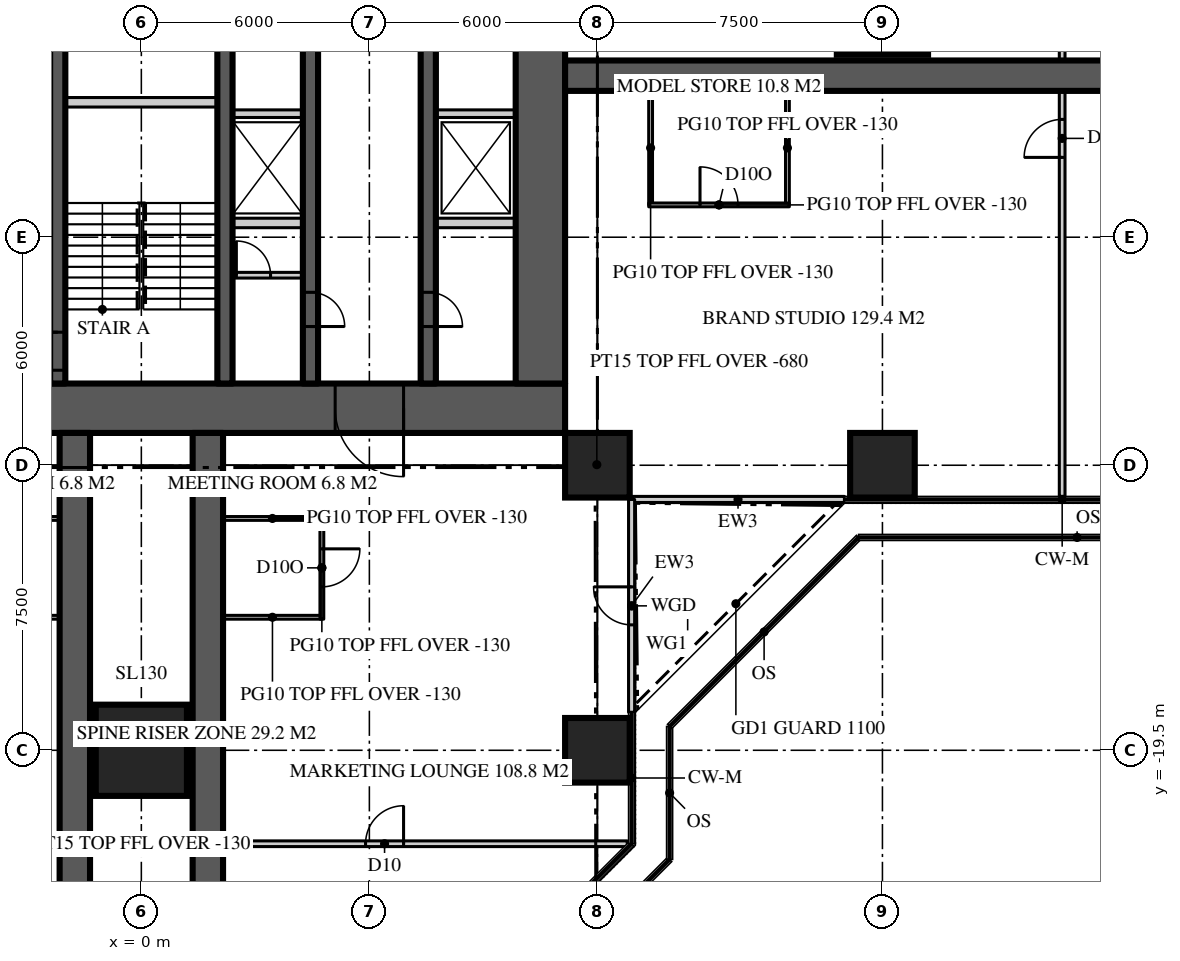
"""IFC4 building model, lengths in metres.
Left out: names, types, materials, properties, quantities, classifications, styles, units other than length and angle.
Written with IfcOpenShell. Run it as: python <this file> out.ifc"""

import sys

from ifc_helpers import new_model, si_unit, direction, frame, frame_2d, origin, origin_2d, place, context, subcontext, project, spatial, rectangle, extrude, element, fill, save


model = new_model("IFC4")
c1 = context("Model", 3, precision=1e-05, world=origin(), true_north=direction((0.0, 1.0)))
c2 = subcontext(c1, "Body", "Model", "MODEL_VIEW")
j1 = project(units=[si_unit("LENGTHUNIT", "METRE"), si_unit("PLANEANGLEUNIT", "RADIAN")], contexts=[c1])
p1 = place(None, origin())
s1 = spatial("IfcSite", under=j1, at=p1, CompositionType="ELEMENT")
p2 = place(p1, origin())
s2 = spatial("IfcBuilding", under=s1, at=p2, CompositionType="ELEMENT")
p3 = place(p2, frame((0.0, 0.0, 186.6)))
s3 = spatial("IfcBuildingStorey", under=s2, at=p3, CompositionType="ELEMENT", Elevation=186.6)
p4 = place(p3, frame((11.15, -10.5, 0.0), z_axis=(0.0, 0.0, 1.0), x_axis=(-1.0, 0.0, 0.0)))
e1 = element("IfcWall", 1, at=p4, inside=s3, PredefinedType="SHEAR", context=c2, shape_type="SweptSolid", body=[
    extrude(rectangle(XDim=22.3, YDim=1.3, at=frame_2d((11.15, 0.0))), origin(), (0.0, 0.0, 1.0), 3.9),
])
p5 = place(p4, frame((16.25, 0.0, 0.0)))
e2 = element("IfcOpeningElement", 2, at=p5, cuts=e1, PredefinedType="OPENING", context=c2, shape_type="SweptSolid", body=[
    extrude(rectangle(XDim=1.8, YDim=2.2, at=frame_2d((0.9, 1.1))), frame((0.0, 0.66, 0.0), z_axis=(0.0, -1.0, 0.0), x_axis=(1.0, 0.0, 0.0)), (0.0, 0.0, 1.0), 1.32),
])
p6 = place(p4, frame((4.25, 0.0, 0.0)))
e3 = element("IfcOpeningElement", 3, at=p6, cuts=e1, PredefinedType="OPENING", context=c2, shape_type="SweptSolid", body=[
    extrude(rectangle(XDim=1.8, YDim=2.2, at=frame_2d((0.9, 1.1))), frame((0.0, 0.66, 0.0), z_axis=(0.0, -1.0, 0.0), x_axis=(1.0, 0.0, 0.0)), (0.0, 0.0, 1.0), 1.32),
])
p7 = place(p3, frame((10.5, -9.85, 0.0), z_axis=(0.0, 0.0, 1.0), x_axis=(0.0, 1.0, 0.0)))
e4 = element("IfcWall", 4, at=p7, inside=s3, PredefinedType="SHEAR", context=c2, shape_type="SweptSolid", body=[
    extrude(rectangle(XDim=19.7, YDim=1.3, at=frame_2d((9.85, 0.0))), origin(), (0.0, 0.0, 1.0), 3.9),
])
p8 = place(p7, frame((17.25, 0.0, 0.0)))
e5 = element("IfcOpeningElement", 5, at=p8, cuts=e4, PredefinedType="OPENING", context=c2, shape_type="SweptSolid", body=[
    extrude(rectangle(XDim=1.0, YDim=2.2, at=frame_2d((0.5, 1.1))), frame((0.0, 0.66, 0.0), z_axis=(0.0, -1.0, 0.0), x_axis=(1.0, 0.0, 0.0)), (0.0, 0.0, 1.0), 1.32),
])
for number, where, z_axis, x_axis in (
    (6, (11.15, -1.75, 0.0), (0.0, 0.0, 1.0), (1.0, 0.0, 0.0)),
    (7, (-1.75, -11.15, 0.0), (0.0, 0.0, 1.0), (0.0, -1.0, 0.0)),
    (8, (1.75, -11.15, 0.0), (0.0, 0.0, 1.0), (0.0, -1.0, 0.0)),
):
    element("IfcWall", number, at=place(p3, frame(where, z_axis=z_axis, x_axis=x_axis)), inside=s3, PredefinedType="SHEAR", context=c2, shape_type="SweptSolid", body=[
        extrude(rectangle(XDim=15.25, YDim=0.8, at=frame_2d((7.625, 0.0))), origin(), (0.0, 0.0, 1.0), 3.9),
    ])
p9 = place(p3, frame((0.0, -19.5, 0.0), z_axis=(0.0, 0.0, 1.0), x_axis=(1.0, 0.0, 0.0)))
e9 = element("IfcColumn", 9, at=p9, inside=s3, PredefinedType="COLUMN", context=c2, shape_type="SweptSolid", body=[
    extrude(rectangle(XDim=2.4, YDim=2.4, at=origin_2d()), origin(), (0.0, 0.0, 1.0), 3.9),
])
for number, where, z_axis, x_axis in (
    (10, (12.0, -19.5, 0.0), (0.0, 0.0, 1.0), (1.0, 0.0, 0.0)),
    (11, (12.0, -12.0, 0.0), (0.0, 0.0, 1.0), (1.0, 0.0, 0.0)),
    (12, (19.5, -12.0, 0.0), (0.0, 0.0, 1.0), (1.0, 0.0, 0.0)),
):
    element("IfcColumn", number, at=place(p3, frame(where, z_axis=z_axis, x_axis=x_axis)), inside=s3, PredefinedType="COLUMN", context=c2, shape_type="SweptSolid", body=[
        extrude(rectangle(XDim=1.7, YDim=1.7, at=origin_2d()), origin(), (0.0, 0.0, 1.0), 3.9),
    ])
p10 = place(p3, frame((19.5, 0.0, 0.0), z_axis=(0.0, 0.0, 1.0), x_axis=(1.0, 0.0, 0.0)))
e13 = element("IfcColumn", 13, at=p10, inside=s3, PredefinedType="COLUMN", context=c2, shape_type="SweptSolid", body=[
    extrude(rectangle(XDim=2.4, YDim=2.4, at=origin_2d()), origin(), (0.0, 0.0, 1.0), 3.9),
])
p11 = place(p3, frame((12.9, -12.9, 0.0), z_axis=(0.0, 0.0, 1.0), x_axis=(1.0, 0.0, 0.0)))
e14 = element("IfcWall", 14, at=p11, inside=s3, PredefinedType="SOLIDWALL", context=c2, shape_type="SweptSolid", body=[
    extrude(rectangle(XDim=5.6, YDim=0.16, at=frame_2d((2.8, 0.0))), origin(), (0.0, 0.0, 1.0), 3.77),
])
p12 = place(p3, frame((12.9, -18.5, 0.0), z_axis=(0.0, 0.0, 1.0), x_axis=(0.0, 1.0, 0.0)))
e15 = element("IfcWall", 15, at=p12, inside=s3, PredefinedType="SOLIDWALL", context=c2, shape_type="SweptSolid", body=[
    extrude(rectangle(XDim=5.6, YDim=0.16, at=frame_2d((2.8, 0.0))), origin(), (0.0, 0.0, 1.0), 3.77),
])
p13 = place(p12, frame((2.3, 0.0, 0.0)))
e16 = element("IfcOpeningElement", 16, at=p13, cuts=e15, PredefinedType="OPENING", context=c2, shape_type="SweptSolid", body=[
    extrude(rectangle(XDim=1.0, YDim=2.2, at=frame_2d((0.5, 1.1))), frame((0.0, 0.09, 0.0), z_axis=(0.0, -1.0, 0.0), x_axis=(1.0, 0.0, 0.0)), (0.0, 0.0, 1.0), 0.18),
])
p14 = place(p3, frame((7.55, 9.85, 0.0), z_axis=(0.0, 0.0, 1.0), x_axis=(0.0, -1.0, 0.0)))
e17 = element("IfcWall", 17, at=p14, inside=s3, PredefinedType="SHEAR", context=c2, shape_type="SweptSolid", body=[
    extrude(rectangle(XDim=19.7, YDim=0.4, at=frame_2d((9.85, 0.0))), origin(), (0.0, 0.0, 1.0), 3.9),
])
p15 = place(p14, frame((1.45, 0.0, 0.0)))
e18 = element("IfcOpeningElement", 18, at=p15, cuts=e17, PredefinedType="OPENING", context=c2, shape_type="SweptSolid", body=[
    extrude(rectangle(XDim=1.0, YDim=2.2, at=frame_2d((0.5, 1.1))), frame((0.0, 0.21, 0.0), z_axis=(0.0, -1.0, 0.0), x_axis=(1.0, 0.0, 0.0)), (0.0, 0.0, 1.0), 0.42),
])
p16 = place(p14, frame((17.3, 0.0, 0.0)))
e19 = element("IfcOpeningElement", 19, at=p16, cuts=e17, PredefinedType="OPENING", context=c2, shape_type="SweptSolid", body=[
    extrude(rectangle(XDim=0.9, YDim=2.1, at=frame_2d((0.45, 1.05))), frame((0.0, 0.21, 0.0), z_axis=(0.0, -1.0, 0.0), x_axis=(1.0, 0.0, 0.0)), (0.0, 0.0, 1.0), 0.42),
])
p17 = place(p3, frame((4.45, 9.85, 0.0), z_axis=(0.0, 0.0, 1.0), x_axis=(0.0, -1.0, 0.0)))
e20 = element("IfcWall", 20, at=p17, inside=s3, PredefinedType="SHEAR", context=c2, shape_type="SweptSolid", body=[
    extrude(rectangle(XDim=19.7, YDim=0.4, at=frame_2d((9.85, 0.0))), origin(), (0.0, 0.0, 1.0), 3.9),
])
p18 = place(p17, frame((1.95, 0.0, 0.0)))
e21 = element("IfcOpeningElement", 21, at=p18, cuts=e20, PredefinedType="OPENING", context=c2, shape_type="SweptSolid", body=[
    extrude(rectangle(XDim=1.0, YDim=2.2, at=frame_2d((0.5, 1.1))), frame((0.0, 0.21, 0.0), z_axis=(0.0, -1.0, 0.0), x_axis=(1.0, 0.0, 0.0)), (0.0, 0.0, 1.0), 0.42),
])
p19 = place(p17, frame((17.3, 0.0, 0.0)))
e22 = element("IfcOpeningElement", 22, at=p19, cuts=e20, PredefinedType="OPENING", context=c2, shape_type="SweptSolid", body=[
    extrude(rectangle(XDim=0.9, YDim=2.1, at=frame_2d((0.45, 1.05))), frame((0.0, 0.21, 0.0), z_axis=(0.0, -1.0, 0.0), x_axis=(1.0, 0.0, 0.0)), (0.0, 0.0, 1.0), 0.42),
])
p20 = place(p3, frame((-2.2, -9.85, 0.0), z_axis=(0.0, 0.0, 1.0), x_axis=(0.0, 1.0, 0.0)))
e23 = element("IfcWall", 23, at=p20, inside=s3, PredefinedType="SHEAR", context=c2, shape_type="SweptSolid", body=[
    extrude(rectangle(XDim=19.7, YDim=0.4, at=frame_2d((9.85, 0.0))), origin(), (0.0, 0.0, 1.0), 3.9),
])
p21 = place(p20, frame((0.35, 0.0, 0.0)))
e24 = element("IfcOpeningElement", 24, at=p21, cuts=e23, PredefinedType="OPENING", context=c2, shape_type="SweptSolid", body=[
    extrude(rectangle(XDim=1.0, YDim=2.2, at=frame_2d((0.5, 1.1))), frame((0.0, 0.21, 0.0), z_axis=(0.0, -1.0, 0.0), x_axis=(1.0, 0.0, 0.0)), (0.0, 0.0, 1.0), 0.42),
])
p22 = place(p3, frame((2.2, 9.85, 0.0), z_axis=(0.0, 0.0, 1.0), x_axis=(0.0, -1.0, 0.0)))
e25 = element("IfcWall", 25, at=p22, inside=s3, PredefinedType="SHEAR", context=c2, shape_type="SweptSolid", body=[
    extrude(rectangle(XDim=19.7, YDim=0.4, at=frame_2d((9.85, 0.0))), origin(), (0.0, 0.0, 1.0), 3.9),
])
p23 = place(p22, frame((0.35, 0.0, 0.0)))
e26 = element("IfcOpeningElement", 26, at=p23, cuts=e25, PredefinedType="OPENING", context=c2, shape_type="SweptSolid", body=[
    extrude(rectangle(XDim=1.0, YDim=2.2, at=frame_2d((0.5, 1.1))), frame((0.0, 0.21, 0.0), z_axis=(0.0, -1.0, 0.0), x_axis=(1.0, 0.0, 0.0)), (0.0, 0.0, 1.0), 0.42),
])
p24 = place(p3, frame((2.4, -5.625, 0.0), z_axis=(0.0, 0.0, 1.0), x_axis=(1.0, 0.0, 0.0)))
e27 = element("IfcWall", 27, at=p24, inside=s3, PredefinedType="SOLIDWALL", context=c2, shape_type="SweptSolid", body=[
    extrude(rectangle(XDim=1.85, YDim=0.25, at=frame_2d((0.925, 0.0))), origin(), (0.0, 0.0, 1.0), 3.7),
])
p25 = place(p3, frame((7.75, -5.625, 0.0), z_axis=(0.0, 0.0, 1.0), x_axis=(1.0, 0.0, 0.0)))
e28 = element("IfcWall", 28, at=p25, inside=s3, PredefinedType="SOLIDWALL", context=c2, shape_type="SweptSolid", body=[
    extrude(rectangle(XDim=2.1, YDim=0.25, at=frame_2d((1.05, 0.0))), origin(), (0.0, 0.0, 1.0), 3.7),
])
p26 = place(p3, frame((-2.0, -2.45, 0.0), z_axis=(0.0, 0.0, 1.0), x_axis=(1.0, 0.0, 0.0)))
e29 = element("IfcWall", 29, at=p26, inside=s3, PredefinedType="SOLIDWALL", context=c2, shape_type="SweptSolid", body=[
    extrude(rectangle(XDim=4.0, YDim=0.25, at=frame_2d((2.0, 0.0))), origin(), (0.0, 0.0, 1.0), 3.7),
])
p27 = place(p3, frame((2.4, -2.75, 0.0), z_axis=(0.0, 0.0, 1.0), x_axis=(1.0, 0.0, 0.0)))
e30 = element("IfcWall", 30, at=p27, inside=s3, PredefinedType="SOLIDWALL", context=c2, shape_type="SweptSolid", body=[
    extrude(rectangle(XDim=1.85, YDim=0.2, at=frame_2d((0.925, 0.0))), origin(), (0.0, 0.0, 1.0), 3.7),
])
p28 = place(p3, frame((7.75, -2.75, 0.0), z_axis=(0.0, 0.0, 1.0), x_axis=(1.0, 0.0, 0.0)))
e31 = element("IfcWall", 31, at=p28, inside=s3, PredefinedType="SOLIDWALL", context=c2, shape_type="SweptSolid", body=[
    extrude(rectangle(XDim=2.1, YDim=0.2, at=frame_2d((1.05, 0.0))), origin(), (0.0, 0.0, 1.0), 3.7),
])
p29 = place(p3, frame((24.229, -12.82, 0.0), z_axis=(0.0, 0.0, 1.0), x_axis=(0.0, 1.0, 0.0)))
e32 = element("IfcWall", 32, at=p29, inside=s3, PredefinedType="PARTITIONING", context=c2, shape_type="SweptSolid", body=[
    extrude(rectangle(XDim=25.64, YDim=0.15, at=frame_2d((12.82, 0.0))), origin(), (0.0, 0.0, 1.0), 3.77),
])
p30 = place(p29, frame((15.72, 0.0, 0.0)))
e33 = element("IfcOpeningElement", 33, at=p30, cuts=e32, PredefinedType="OPENING", context=c2, shape_type="SweptSolid", body=[
    extrude(rectangle(XDim=1.0, YDim=2.2, at=frame_2d((0.5, 1.1))), frame((0.0, 0.085, 0.0), z_axis=(0.0, -1.0, 0.0), x_axis=(1.0, 0.0, 0.0)), (0.0, 0.0, 1.0), 0.17),
])
p31 = place(p29, frame((8.92, 0.0, 0.0)))
e34 = element("IfcOpeningElement", 34, at=p31, cuts=e32, PredefinedType="OPENING", context=c2, shape_type="SweptSolid", body=[
    extrude(rectangle(XDim=1.0, YDim=2.2, at=frame_2d((0.5, 1.1))), frame((0.0, 0.085, 0.0), z_axis=(0.0, -1.0, 0.0), x_axis=(1.0, 0.0, 0.0)), (0.0, 0.0, 1.0), 0.17),
])
for number, where, z_axis, x_axis in (
    (35, (13.4, -2.15, 0.0), (0.0, 0.0, 1.0), (0.0, -1.0, 0.0)),
    (36, (17.0, -2.15, 0.0), (0.0, 0.0, 1.0), (0.0, -1.0, 0.0)),
):
    element("IfcWall", number, at=place(p3, frame(where, z_axis=z_axis, x_axis=x_axis)), inside=s3, PredefinedType="PARTITIONING", context=c2, shape_type="SweptSolid", body=[
        extrude(rectangle(XDim=3.0, YDim=0.1, at=frame_2d((1.5, 0.0))), origin(), (0.0, 0.0, 1.0), 3.77),
    ])
p32 = place(p3, frame((13.35, -5.15, 0.0), z_axis=(0.0, 0.0, 1.0), x_axis=(1.0, 0.0, 0.0)))
e37 = element("IfcWall", 37, at=p32, inside=s3, PredefinedType="PARTITIONING", context=c2, shape_type="SweptSolid", body=[
    extrude(rectangle(XDim=3.7, YDim=0.1, at=frame_2d((1.85, 0.0))), origin(), (0.0, 0.0, 1.0), 3.77),
])
p33 = place(p32, frame((1.35, 0.0, 0.0)))
e38 = element("IfcOpeningElement", 38, at=p33, cuts=e37, PredefinedType="OPENING", context=c2, shape_type="SweptSolid", body=[
    extrude(rectangle(XDim=1.0, YDim=2.2, at=frame_2d((0.5, 1.1))), frame((0.0, 0.06, 0.0), z_axis=(0.0, -1.0, 0.0), x_axis=(1.0, 0.0, 0.0)), (0.0, 0.0, 1.0), 0.12),
])
p34 = place(p3, frame((-12.786, -21.959, 0.0), z_axis=(0.0, 0.0, 1.0), x_axis=(1.0, 0.0, 0.0)))
e39 = element("IfcWall", 39, at=p34, inside=s3, PredefinedType="PARTITIONING", context=c2, shape_type="SweptSolid", body=[
    extrude(rectangle(XDim=25.573, YDim=0.15, at=frame_2d((12.786, 0.0))), origin(), (0.0, 0.0, 1.0), 3.77),
])
p35 = place(p34, frame((18.687, 0.0, 0.0)))
e40 = element("IfcOpeningElement", 40, at=p35, cuts=e39, PredefinedType="OPENING", context=c2, shape_type="SweptSolid", body=[
    extrude(rectangle(XDim=1.0, YDim=2.2, at=frame_2d((0.5, 1.1))), frame((0.0, 0.085, 0.0), z_axis=(0.0, -1.0, 0.0), x_axis=(1.0, 0.0, 0.0)), (0.0, 0.0, 1.0), 0.17),
])
p36 = place(p34, frame((5.886, 0.0, 0.0)))
e41 = element("IfcOpeningElement", 41, at=p36, cuts=e39, PredefinedType="OPENING", context=c2, shape_type="SweptSolid", body=[
    extrude(rectangle(XDim=1.0, YDim=2.2, at=frame_2d((0.5, 1.1))), frame((0.0, 0.085, 0.0), z_axis=(0.0, -1.0, 0.0), x_axis=(1.0, 0.0, 0.0)), (0.0, 0.0, 1.0), 0.17),
])
for number, where, z_axis, x_axis in (
    (42, (2.15, -13.4, 0.0), (0.0, 0.0, 1.0), (1.0, 0.0, 0.0)),
    (43, (2.15, -16.0, 0.0), (0.0, 0.0, 1.0), (1.0, 0.0, 0.0)),
):
    element("IfcWall", number, at=place(p3, frame(where, z_axis=z_axis, x_axis=x_axis)), inside=s3, PredefinedType="PARTITIONING", context=c2, shape_type="SweptSolid", body=[
        extrude(rectangle(XDim=2.6, YDim=0.1, at=frame_2d((1.3, 0.0))), origin(), (0.0, 0.0, 1.0), 3.77),
    ])
p37 = place(p3, frame((4.75, -13.35, 0.0), z_axis=(0.0, 0.0, 1.0), x_axis=(0.0, -1.0, 0.0)))
e44 = element("IfcWall", 44, at=p37, inside=s3, PredefinedType="PARTITIONING", context=c2, shape_type="SweptSolid", body=[
    extrude(rectangle(XDim=2.7, YDim=0.1, at=frame_2d((1.35, 0.0))), origin(), (0.0, 0.0, 1.0), 3.77),
])
p38 = place(p37, frame((0.85, 0.0, 0.0)))
e45 = element("IfcOpeningElement", 45, at=p38, cuts=e44, PredefinedType="OPENING", context=c2, shape_type="SweptSolid", body=[
    extrude(rectangle(XDim=1.0, YDim=2.2, at=frame_2d((0.5, 1.1))), frame((0.0, 0.06, 0.0), z_axis=(0.0, -1.0, 0.0), x_axis=(1.0, 0.0, 0.0)), (0.0, 0.0, 1.0), 0.12),
])
for number, where, z_axis, x_axis in (
    (46, (-2.15, -13.4, 0.0), (0.0, 0.0, 1.0), (-1.0, 0.0, 0.0)),
    (47, (-2.15, -16.0, 0.0), (0.0, 0.0, 1.0), (-1.0, 0.0, 0.0)),
):
    element("IfcWall", number, at=place(p3, frame(where, z_axis=z_axis, x_axis=x_axis)), inside=s3, PredefinedType="PARTITIONING", context=c2, shape_type="SweptSolid", body=[
        extrude(rectangle(XDim=2.6, YDim=0.1, at=frame_2d((1.3, 0.0))), origin(), (0.0, 0.0, 1.0), 3.77),
    ])
p39 = place(p3, frame((11.15, -11.15, 0.0), z_axis=(0.0, 0.0, 1.0), x_axis=(0.707106781187, -0.707106781187, 0.0)))
e48 = element("IfcWall", 48, at=p39, inside=s3, PredefinedType="PARTITIONING", context=c2, shape_type="SweptSolid", body=[
    extrude(rectangle(XDim=2.362, YDim=0.15, at=frame_2d((1.181, 0.0))), origin(), (0.0, 0.0, 1.0), 3.22),
])
p40 = place(p3, frame((2.4, -7.0, 0.0), z_axis=(0.0, 0.0, 1.0), x_axis=(1.0, 0.0, 0.0)))
e49 = element("IfcWall", 49, at=p40, inside=s3, PredefinedType="SOLIDWALL", context=c2, shape_type="SweptSolid", body=[
    extrude(rectangle(XDim=1.85, YDim=0.15, at=frame_2d((0.925, 0.0))), origin(), (0.0, 0.0, 1.0), 3.77),
])
p41 = place(p40, frame((0.1, 0.0, 0.0)))
e50 = element("IfcOpeningElement", 50, at=p41, cuts=e49, PredefinedType="OPENING", context=c2, shape_type="SweptSolid", body=[
    extrude(rectangle(XDim=0.9, YDim=2.1, at=frame_2d((0.45, 1.05))), frame((0.0, 0.085, 0.0), z_axis=(0.0, -1.0, 0.0), x_axis=(1.0, 0.0, 0.0)), (0.0, 0.0, 1.0), 0.17),
])
p42 = place(p13, origin())
e51 = element("IfcDoor", 51, at=p42, inside=s3, OperationType="SINGLE_SWING_RIGHT", PredefinedType="DOOR", context=c2, shape_type="SweptSolid", body=[
    extrude(rectangle(XDim=1.0, YDim=2.2, at=frame_2d((0.5, 1.1))), frame((0.0, 0.025, 0.0), z_axis=(0.0, -1.0, 0.0), x_axis=(1.0, 0.0, 0.0)), (0.0, 0.0, 1.0), 0.05),
])
fill(e16, e51)
p43 = place(p6, origin())
e52 = element("IfcDoor", 52, at=p43, inside=s3, OperationType="DOUBLE_DOOR_DOUBLE_SWING", PredefinedType="DOOR", context=c2, shape_type="SweptSolid", body=[
    extrude(rectangle(XDim=1.8, YDim=2.2, at=frame_2d((0.9, 1.1))), frame((0.0, 0.025, 0.0), z_axis=(0.0, -1.0, 0.0), x_axis=(1.0, 0.0, 0.0)), (0.0, 0.0, 1.0), 0.05),
])
fill(e3, e52)
p44 = place(p21, origin())
e53 = element("IfcDoor", 53, at=p44, inside=s3, OperationType="SINGLE_SWING_RIGHT", PredefinedType="DOOR", context=c2, shape_type="SweptSolid", body=[
    extrude(rectangle(XDim=1.0, YDim=2.2, at=frame_2d((0.5, 1.1))), frame((0.0, 0.025, 0.0), z_axis=(0.0, -1.0, 0.0), x_axis=(1.0, 0.0, 0.0)), (0.0, 0.0, 1.0), 0.05),
])
fill(e24, e53)
p45 = place(p16, origin())
e54 = element("IfcDoor", 54, at=p45, inside=s3, OperationType="SINGLE_SWING_RIGHT", PredefinedType="DOOR", context=c2, shape_type="SweptSolid", body=[
    extrude(rectangle(XDim=0.9, YDim=2.1, at=frame_2d((0.45, 1.05))), frame((0.0, 0.025, 0.0), z_axis=(0.0, -1.0, 0.0), x_axis=(1.0, 0.0, 0.0)), (0.0, 0.0, 1.0), 0.05),
])
fill(e19, e54)
p46 = place(p19, origin())
e55 = element("IfcDoor", 55, at=p46, inside=s3, OperationType="SINGLE_SWING_RIGHT", PredefinedType="DOOR", context=c2, shape_type="SweptSolid", body=[
    extrude(rectangle(XDim=0.9, YDim=2.1, at=frame_2d((0.45, 1.05))), frame((0.0, 0.025, 0.0), z_axis=(0.0, -1.0, 0.0), x_axis=(1.0, 0.0, 0.0)), (0.0, 0.0, 1.0), 0.05),
])
fill(e22, e55)
p47 = place(p31, origin())
e56 = element("IfcDoor", 56, at=p47, inside=s3, OperationType="SINGLE_SWING_LEFT", PredefinedType="DOOR", context=c2, shape_type="SweptSolid", body=[
    extrude(rectangle(XDim=1.0, YDim=2.2, at=frame_2d((0.5, 1.1))), frame((0.0, 0.025, 0.0), z_axis=(0.0, -1.0, 0.0), x_axis=(1.0, 0.0, 0.0)), (0.0, 0.0, 1.0), 0.05),
])
fill(e34, e56)
p48 = place(p33, origin())
e57 = element("IfcDoor", 57, at=p48, inside=s3, OperationType="SINGLE_SWING_LEFT", PredefinedType="DOOR", context=c2, shape_type="SweptSolid", body=[
    extrude(rectangle(XDim=1.0, YDim=2.2, at=frame_2d((0.5, 1.1))), frame((0.0, 0.025, 0.0), z_axis=(0.0, -1.0, 0.0), x_axis=(1.0, 0.0, 0.0)), (0.0, 0.0, 1.0), 0.05),
])
fill(e38, e57)
p49 = place(p35, origin())
e58 = element("IfcDoor", 58, at=p49, inside=s3, OperationType="SINGLE_SWING_RIGHT", PredefinedType="DOOR", context=c2, shape_type="SweptSolid", body=[
    extrude(rectangle(XDim=1.0, YDim=2.2, at=frame_2d((0.5, 1.1))), frame((0.0, 0.025, 0.0), z_axis=(0.0, -1.0, 0.0), x_axis=(1.0, 0.0, 0.0)), (0.0, 0.0, 1.0), 0.05),
])
fill(e40, e58)
p50 = place(p38, origin())
e59 = element("IfcDoor", 59, at=p50, inside=s3, OperationType="SINGLE_SWING_LEFT", PredefinedType="DOOR", context=c2, shape_type="SweptSolid", body=[
    extrude(rectangle(XDim=1.0, YDim=2.2, at=frame_2d((0.5, 1.1))), frame((0.0, 0.025, 0.0), z_axis=(0.0, -1.0, 0.0), x_axis=(1.0, 0.0, 0.0)), (0.0, 0.0, 1.0), 0.05),
])
fill(e45, e59)
p51 = place(p41, origin())
e60 = element("IfcDoor", 60, at=p51, inside=s3, OperationType="SINGLE_SWING_LEFT", PredefinedType="DOOR", context=c2, shape_type="SweptSolid", body=[
    extrude(rectangle(XDim=0.9, YDim=2.1, at=frame_2d((0.45, 1.05))), frame((0.0, 0.025, 0.0), z_axis=(0.0, -1.0, 0.0), x_axis=(1.0, 0.0, 0.0)), (0.0, 0.0, 1.0), 0.05),
])
fill(e50, e60)
save(model, sys.argv[1])
